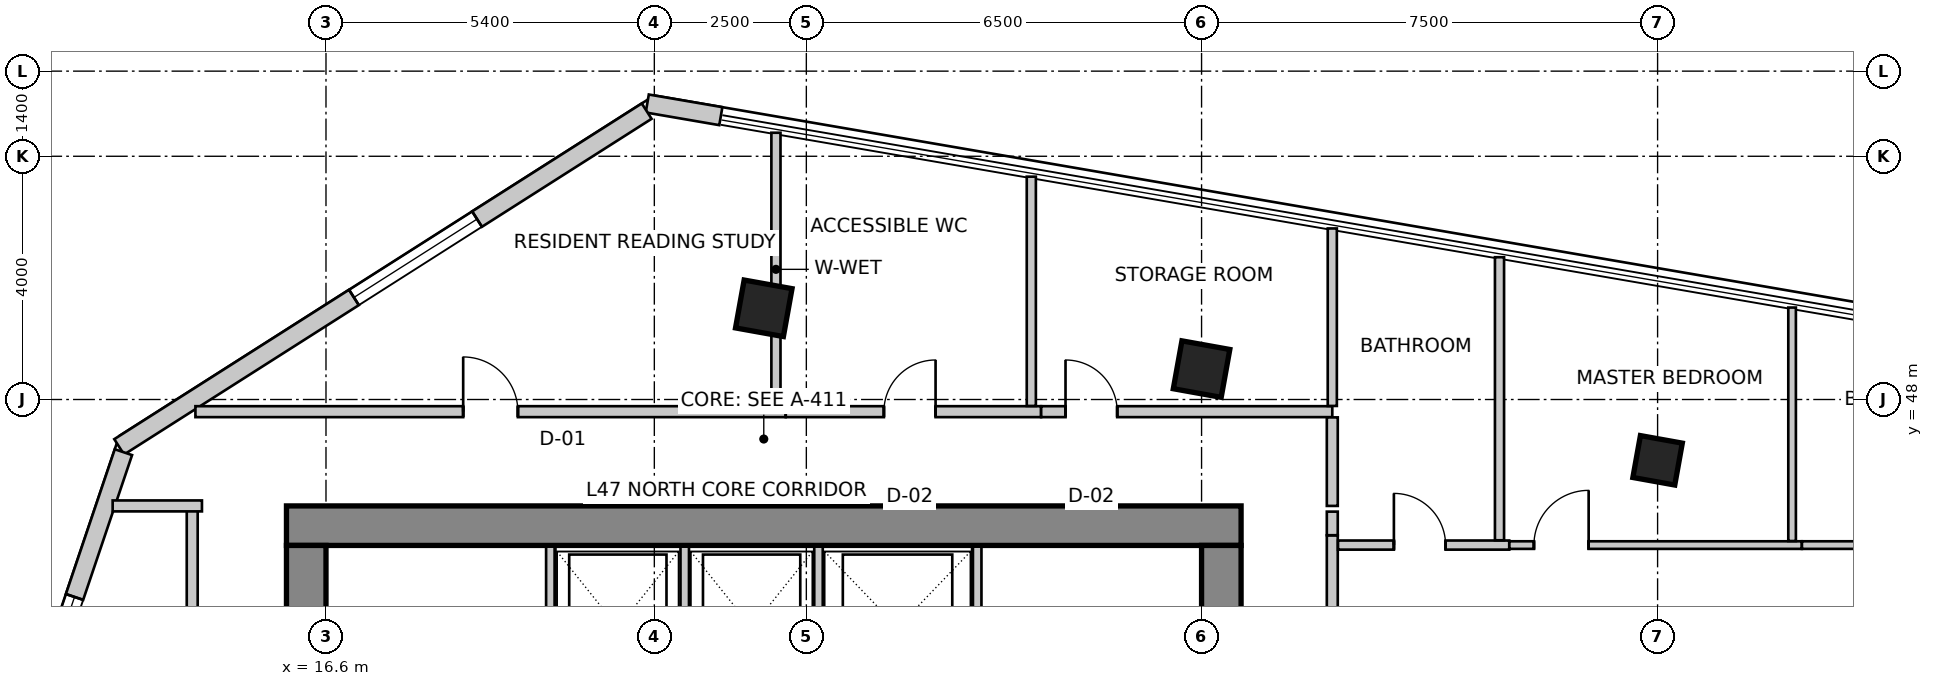
"""IFC4 building model, lengths in metres.
Left out: names, types, materials, properties, quantities, classifications, styles, units other than length and angle.
Written with IfcOpenShell. Run it as: python <this file> out.ifc"""

import sys

from ifc_helpers import new_model, si_unit, direction, frame, frame_2d, origin, origin_2d, place, context, subcontext, project, spatial, rectangle, extrude, source, transform, mapped, element, fill, save


model = new_model("IFC4")
c1 = context("Model", 3, precision=1e-05, world=origin(), true_north=direction((0.0, 1.0)))
c2 = subcontext(c1, "Body", "Model", "MODEL_VIEW")
j1 = project(units=[si_unit("LENGTHUNIT", "METRE"), si_unit("PLANEANGLEUNIT", "RADIAN")], contexts=[c1])
p1 = place(None, origin())
s1 = spatial("IfcSite", under=j1, at=p1, CompositionType="ELEMENT")
p2 = place(p1, origin())
s2 = spatial("IfcBuilding", under=s1, at=p2, CompositionType="ELEMENT")
p3 = place(p2, frame((0.0, 0.0, 190.4)))
s3 = spatial("IfcBuildingStorey", under=s2, at=p3, CompositionType="ELEMENT", Elevation=190.4)
p4 = place(p3, frame((15.95, 45.925, 0.0), z_axis=(0.0, 0.0, 1.0), x_axis=(1.0, 0.0, 0.0)))
e1 = element("IfcWall", 1, at=p4, inside=s3, PredefinedType="SHEAR", context=c2, shape_type="SweptSolid", body=[
    extrude(rectangle(XDim=15.7, YDim=0.65, at=frame_2d((7.85, 0.0))), origin(), (0.0, 0.0, 1.0), 3.5),
])
p5 = place(p3, frame((16.275, 34.2, 0.0), z_axis=(0.0, 0.0, 1.0), x_axis=(0.0, 1.0, 0.0)))
e2 = element("IfcWall", 2, at=p5, inside=s3, PredefinedType="SHEAR", context=c2, shape_type="SweptSolid", body=[
    extrude(rectangle(XDim=11.4, YDim=0.65, at=frame_2d((5.7, 0.0))), origin(), (0.0, 0.0, 1.0), 3.5),
])
m1 = source(origin(), c2, "Body", "SweptSolid", [
    extrude(rectangle(XDim=1.1, YDim=2.15, at=frame_2d((0.55, 1.075))), frame((0.0, 0.335, 0.0), z_axis=(0.0, -1.0, 0.0), x_axis=(1.0, 0.0, 0.0)), (0.0, 0.0, 1.0), 0.67),
])
p6 = place(p5, frame((7.15, 0.0, 0.0)))
e3 = element("IfcOpeningElement", 3, at=p6, cuts=e2, PredefinedType="OPENING", context=c2, shape_type="MappedRepresentation", body=[
    mapped(m1, transform((0.0, 0.0, 0.0), scale=1.0)),
])
p7 = place(p3, frame((31.325, 34.2, 0.0), z_axis=(0.0, 0.0, 1.0), x_axis=(0.0, 1.0, 0.0)))
e4 = element("IfcWall", 4, at=p7, inside=s3, PredefinedType="SHEAR", context=c2, shape_type="SweptSolid", body=[
    extrude(rectangle(XDim=11.4, YDim=0.65, at=frame_2d((5.7, 0.0))), origin(), (0.0, 0.0, 1.0), 3.5),
])
p8 = place(p7, frame((7.35, 0.0, 0.0)))
e5 = element("IfcOpeningElement", 5, at=p8, cuts=e4, PredefinedType="OPENING", context=c2, shape_type="MappedRepresentation", body=[
    mapped(m1, transform((0.0, 0.0, 0.0), scale=1.0)),
])
m2 = source(origin(), c2, "Body", "SweptSolid", [
    extrude(rectangle(XDim=0.8, YDim=0.8, at=origin_2d()), origin(), (0.0, 0.0, 1.0), 3.5),
])
for number, where, z_axis, x_axis in (
    (6, (23.8, 49.5, 0.0), (0.0, 0.0, 1.0), (0.984, -0.177, 0.0)),
    (7, (31.0, 48.5, 0.0), (0.0, 0.0, 1.0), (0.984, -0.177, 0.0)),
):
    element("IfcColumn", number, at=place(p3, frame(where, z_axis=z_axis, x_axis=x_axis)), inside=s3, PredefinedType="COLUMN", context=c2, shape_type="MappedRepresentation", body=[
        mapped(m2, transform((0.0, 0.0, 0.0), scale=1.0)),
    ])
m3 = source(origin(), c2, "Body", "SweptSolid", [
    extrude(rectangle(XDim=0.7, YDim=0.7, at=origin_2d()), origin(), (0.0, 0.0, 1.0), 3.5),
])
p9 = place(p3, frame((38.5, 47.0, 0.0), z_axis=(0.0, 0.0, 1.0), x_axis=(0.984195607969, -0.17708474032, 0.0)))
e8 = element("IfcColumn", 8, at=p9, inside=s3, PredefinedType="COLUMN", context=c2, shape_type="MappedRepresentation", body=[
    mapped(m3, transform((0.0, 0.0, 0.0), scale=1.0)),
])
p10 = place(p3, frame((23.094, 52.66, 0.0), z_axis=(0.0, 0.0, 1.0), x_axis=(-0.985503719785, 0.169653818966, 0.0)))
e9 = element("IfcWall", 9, at=p10, inside=s3, PredefinedType="SOLIDWALL", context=c2, shape_type="SweptSolid", body=[
    extrude(rectangle(XDim=1.228, YDim=0.3, at=frame_2d((0.614, 0.0))), origin(), (0.0, 0.0, 1.0), 3.25),
])
p11 = place(p3, frame((21.875, 52.742, 0.0), z_axis=(0.0, 0.0, 1.0), x_axis=(-0.843666375448, -0.536867811419, 0.0)))
e10 = element("IfcWall", 10, at=p11, inside=s3, PredefinedType="SOLIDWALL", context=c2, shape_type="SweptSolid", body=[
    extrude(rectangle(XDim=10.284, YDim=0.3, at=frame_2d((5.142, 0.0))), origin(), (0.0, 0.0, 1.0), 3.25),
])
m4 = source(origin(), c2, "Body", "SweptSolid", [
    extrude(rectangle(XDim=2.4, YDim=2.2, at=frame_2d((1.2, 1.1))), frame((0.0, 0.16, 0.0), z_axis=(0.0, -1.0, 0.0), x_axis=(1.0, 0.0, 0.0)), (0.0, 0.0, 1.0), 0.32),
])
p12 = place(p11, frame((3.307, 0.0, 0.85)))
e11 = element("IfcOpeningElement", 11, at=p12, cuts=e10, PredefinedType="OPENING", context=c2, shape_type="MappedRepresentation", body=[
    mapped(m4, transform((0.0, 0.0, 0.0), scale=1.0)),
])
p13 = place(p3, frame((13.269, 47.134, 0.0), z_axis=(0.0, 0.0, 1.0), x_axis=(-0.319920776449, -0.947444297464, 0.0)))
e12 = element("IfcWall", 12, at=p13, inside=s3, PredefinedType="SOLIDWALL", context=c2, shape_type="SweptSolid", body=[
    extrude(rectangle(XDim=16.133, YDim=0.3, at=frame_2d((8.067, 0.0))), origin(), (0.0, 0.0, 1.0), 3.25),
])
m5 = source(origin(), c2, "Body", "SweptSolid", [
    extrude(rectangle(XDim=2.1, YDim=2.0, at=frame_2d((1.05, 1.0))), frame((0.0, 0.16, 0.0), z_axis=(0.0, -1.0, 0.0), x_axis=(1.0, 0.0, 0.0)), (0.0, 0.0, 1.0), 0.32),
])
p14 = place(p13, frame((2.513, 0.0, 0.85)))
e13 = element("IfcOpeningElement", 13, at=p14, cuts=e12, PredefinedType="OPENING", context=c2, shape_type="MappedRepresentation", body=[
    mapped(m5, transform((0.0, 0.0, 0.0), scale=1.0)),
])
p15 = place(p13, frame((7.26, 0.0, 0.85)))
e14 = element("IfcOpeningElement", 14, at=p15, cuts=e12, PredefinedType="OPENING", context=c2, shape_type="MappedRepresentation", body=[
    mapped(m4, transform((0.0, 0.0, 0.0), scale=1.0)),
])
p16 = place(p13, frame((12.307, 0.0, 0.85)))
e15 = element("IfcOpeningElement", 15, at=p16, cuts=e12, PredefinedType="OPENING", context=c2, shape_type="MappedRepresentation", body=[
    mapped(m5, transform((0.0, 0.0, 0.0), scale=1.0)),
])
for number, where, z_axis, x_axis in (
    (16, (20.29, 43.28, 0.0), (0.0, 0.0, 1.0), (0.0, 1.0, 0.0)),
    (17, (27.31, 43.28, 0.0), (0.0, 0.0, 1.0), (0.0, 1.0, 0.0)),
):
    element("IfcWall", number, at=place(p3, frame(where, z_axis=z_axis, x_axis=x_axis)), inside=s3, PredefinedType="SOLIDWALL", context=c2, shape_type="SweptSolid", body=[
        extrude(rectangle(XDim=2.3, YDim=0.14, at=frame_2d((1.15, 0.0))), origin(), (0.0, 0.0, 1.0), 3.25),
    ])
for number, where, z_axis, x_axis in (
    (18, (22.5, 43.02, 0.0), (0.0, 0.0, 1.0), (0.0, 1.0, 0.0)),
    (19, (24.7, 43.02, 0.0), (0.0, 0.0, 1.0), (0.0, 1.0, 0.0)),
):
    element("IfcWall", number, at=place(p3, frame(where, z_axis=z_axis, x_axis=x_axis)), inside=s3, PredefinedType="SOLIDWALL", context=c2, shape_type="SweptSolid", body=[
        extrude(rectangle(XDim=2.56, YDim=0.14, at=frame_2d((1.28, 0.0))), origin(), (0.0, 0.0, 1.0), 3.25),
    ])
p17 = place(p3, frame((14.4, 33.644, 0.0), z_axis=(0.0, 0.0, 1.0), x_axis=(0.0, 1.0, 0.0)))
e20 = element("IfcWall", 20, at=p17, inside=s3, PredefinedType="PARTITIONING", context=c2, shape_type="SweptSolid", body=[
    extrude(rectangle(XDim=12.606, YDim=0.18, at=frame_2d((6.303, 0.0))), origin(), (0.0, 0.0, 1.0), 3.25),
])
m6 = source(origin(), c2, "Body", "SweptSolid", [
    extrude(rectangle(XDim=0.9, YDim=2.15, at=frame_2d((0.45, 1.075))), frame((0.0, 0.1, 0.0), z_axis=(0.0, -1.0, 0.0), x_axis=(1.0, 0.0, 0.0)), (0.0, 0.0, 1.0), 0.2),
])
p18 = place(p17, frame((4.399, 0.0, 0.0)))
e21 = element("IfcOpeningElement", 21, at=p18, cuts=e20, PredefinedType="OPENING", context=c2, shape_type="MappedRepresentation", body=[
    mapped(m6, transform((0.0, 0.0, 0.0), scale=1.0)),
])
p19 = place(p3, frame((14.56, 46.25, 0.0), z_axis=(0.0, 0.0, 1.0), x_axis=(-1.0, 0.0, 0.0)))
e22 = element("IfcWall", 22, at=p19, inside=s3, PredefinedType="PARTITIONING", context=c2, shape_type="SweptSolid", body=[
    extrude(rectangle(XDim=1.469, YDim=0.18, at=frame_2d((0.734, 0.0))), origin(), (0.0, 0.0, 1.0), 3.25),
])
p20 = place(p3, frame((14.453, 47.8, 0.0), z_axis=(0.0, 0.0, 1.0), x_axis=(1.0, 0.0, 0.0)))
e23 = element("IfcWall", 23, at=p20, inside=s3, PredefinedType="PARTITIONING", context=c2, shape_type="SweptSolid", body=[
    extrude(rectangle(XDim=9.707, YDim=0.18, at=frame_2d((4.854, 0.0))), origin(), (0.0, 0.0, 1.0), 2.934),
])
p21 = place(p20, frame((4.404, 0.0, 0.0)))
e24 = element("IfcOpeningElement", 24, at=p21, cuts=e23, PredefinedType="OPENING", context=c2, shape_type="MappedRepresentation", body=[
    mapped(m6, transform((0.0, 0.0, 0.0), scale=1.0)),
])
p22 = place(p3, frame((24.162, 47.8, 0.0), z_axis=(0.0, 0.0, 1.0), x_axis=(1.0, 0.0, 0.0)))
e25 = element("IfcWall", 25, at=p22, inside=s3, PredefinedType="PARTITIONING", context=c2, shape_type="SweptSolid", body=[
    extrude(rectangle(XDim=4.198, YDim=0.18, at=frame_2d((2.099, 0.0))), origin(), (0.0, 0.0, 1.0), 3.25),
])
m7 = source(origin(), c2, "Body", "SweptSolid", [
    extrude(rectangle(XDim=0.85, YDim=2.15, at=frame_2d((0.425, 1.075))), frame((0.0, 0.1, 0.0), z_axis=(0.0, -1.0, 0.0), x_axis=(1.0, 0.0, 0.0)), (0.0, 0.0, 1.0), 0.2),
])
p23 = place(p22, frame((1.613, 0.0, 0.0)))
e26 = element("IfcOpeningElement", 26, at=p23, cuts=e25, PredefinedType="OPENING", context=c2, shape_type="MappedRepresentation", body=[
    mapped(m7, transform((0.0, 0.0, 0.0), scale=1.0)),
])
p24 = place(p3, frame((28.362, 47.8, 0.0), z_axis=(0.0, 0.0, 1.0), x_axis=(1.0, 0.0, 0.0)))
e27 = element("IfcWall", 27, at=p24, inside=s3, PredefinedType="PARTITIONING", context=c2, shape_type="SweptSolid", body=[
    extrude(rectangle(XDim=4.788, YDim=0.18, at=frame_2d((2.394, 0.0))), origin(), (0.0, 0.0, 1.0), 2.822),
])
p25 = place(p24, frame((0.401, 0.0, 0.0)))
e28 = element("IfcOpeningElement", 28, at=p25, cuts=e27, PredefinedType="OPENING", context=c2, shape_type="MappedRepresentation", body=[
    mapped(m7, transform((0.0, 0.0, 0.0), scale=1.0)),
])
p26 = place(p3, frame((33.15, 47.706, 0.0), z_axis=(0.0, 0.0, 1.0), x_axis=(0.0, -1.0, 0.0)))
e29 = element("IfcWall", 29, at=p26, inside=s3, PredefinedType="PARTITIONING", context=c2, shape_type="SweptSolid", body=[
    extrude(rectangle(XDim=1.456, YDim=0.18, at=frame_2d((0.728, 0.0))), origin(), (0.0, 0.0, 1.0), 2.822),
])
p27 = place(p3, frame((33.15, 45.766, 0.0), z_axis=(0.0, 0.0, 1.0), x_axis=(0.0, -1.0, 0.0)))
e30 = element("IfcWall", 30, at=p27, inside=s3, PredefinedType="PARTITIONING", context=c2, shape_type="SweptSolid", body=[
    extrude(rectangle(XDim=5.526, YDim=0.18, at=frame_2d((2.763, 0.0))), origin(), (0.0, 0.0, 1.0), 2.822),
])
p28 = place(p3, frame((33.15, 46.156, 0.0), z_axis=(0.0, 0.0, 1.0), x_axis=(0.0, -1.0, 0.0)))
e31 = element("IfcWall", 31, at=p28, inside=s3, PredefinedType="PARTITIONING", context=c2, shape_type="SweptSolid", body=[
    extrude(rectangle(XDim=0.388, YDim=0.18, at=frame_2d((0.194, 0.0))), origin(), (0.0, 0.0, 1.0), 2.934),
])
p29 = place(p3, frame((24.0, 52.387, 0.0), z_axis=(0.0, 0.0, 1.0), x_axis=(0.0, -1.0, 0.0)))
e32 = element("IfcWall", 32, at=p29, inside=s3, PredefinedType="PARTITIONING", context=c2, shape_type="SweptSolid", body=[
    extrude(rectangle(XDim=4.493, YDim=0.15, at=frame_2d((2.247, 0.0))), origin(), (0.0, 0.0, 1.0), 2.542),
])
p30 = place(p3, frame((28.2, 51.665, 0.0), z_axis=(0.0, 0.0, 1.0), x_axis=(0.0, -1.0, 0.0)))
e33 = element("IfcWall", 33, at=p30, inside=s3, PredefinedType="PARTITIONING", context=c2, shape_type="SweptSolid", body=[
    extrude(rectangle(XDim=3.771, YDim=0.15, at=frame_2d((1.885, 0.0))), origin(), (0.0, 0.0, 1.0), 2.542),
])
p31 = place(p3, frame((33.15, 50.813, 0.0), z_axis=(0.0, 0.0, 1.0), x_axis=(0.0, -1.0, 0.0)))
e34 = element("IfcWall", 34, at=p31, inside=s3, PredefinedType="PARTITIONING", context=c2, shape_type="SweptSolid", body=[
    extrude(rectangle(XDim=2.919, YDim=0.15, at=frame_2d((1.459, 0.0))), origin(), (0.0, 0.0, 1.0), 2.542),
])
p32 = place(p3, frame((33.244, 45.606, 0.0), z_axis=(0.0, 0.0, 1.0), x_axis=(1.0, 0.0, 0.0)))
e35 = element("IfcWall", 35, at=p32, inside=s3, PredefinedType="PARTITIONING", context=c2, shape_type="SweptSolid", body=[
    extrude(rectangle(XDim=2.816, YDim=0.15, at=frame_2d((1.408, 0.0))), origin(), (0.0, 0.0, 1.0), 2.822),
])
m8 = source(origin(), c2, "Body", "SweptSolid", [
    extrude(rectangle(XDim=0.85, YDim=2.15, at=frame_2d((0.425, 1.075))), frame((0.0, 0.085, 0.0), z_axis=(0.0, -1.0, 0.0), x_axis=(1.0, 0.0, 0.0)), (0.0, 0.0, 1.0), 0.17),
])
p33 = place(p32, frame((0.919, 0.0, 0.0)))
e36 = element("IfcOpeningElement", 36, at=p33, cuts=e35, PredefinedType="OPENING", context=c2, shape_type="MappedRepresentation", body=[
    mapped(m8, transform((0.0, 0.0, 0.0), scale=1.0)),
])
p34 = place(p3, frame((36.062, 45.606, 0.0), z_axis=(0.0, 0.0, 1.0), x_axis=(1.0, 0.0, 0.0)))
e37 = element("IfcWall", 37, at=p34, inside=s3, PredefinedType="PARTITIONING", context=c2, shape_type="SweptSolid", body=[
    extrude(rectangle(XDim=4.81, YDim=0.125, at=frame_2d((2.405, 0.0))), origin(), (0.0, 0.0, 1.0), 2.766),
])
m9 = source(origin(), c2, "Body", "SweptSolid", [
    extrude(rectangle(XDim=0.9, YDim=2.15, at=frame_2d((0.45, 1.075))), frame((0.0, 0.073, 0.0), z_axis=(0.0, -1.0, 0.0), x_axis=(1.0, 0.0, 0.0)), (0.0, 0.0, 1.0), 0.145),
])
p35 = place(p34, frame((0.404, 0.0, 0.0)))
e38 = element("IfcOpeningElement", 38, at=p35, cuts=e37, PredefinedType="OPENING", context=c2, shape_type="MappedRepresentation", body=[
    mapped(m9, transform((0.0, 0.0, 0.0), scale=1.0)),
])
p36 = place(p3, frame((40.874, 45.606, 0.0), z_axis=(0.0, 0.0, 1.0), x_axis=(1.0, 0.0, 0.0)))
e39 = element("IfcWall", 39, at=p36, inside=s3, PredefinedType="PARTITIONING", context=c2, shape_type="SweptSolid", body=[
    extrude(rectangle(XDim=1.409, YDim=0.125, at=frame_2d((0.705, 0.0))), origin(), (0.0, 0.0, 1.0), 3.25),
])
p37 = place(p3, frame((35.9, 50.34, 0.0), z_axis=(0.0, 0.0, 1.0), x_axis=(0.0, -1.0, 0.0)))
e40 = element("IfcWall", 40, at=p37, inside=s3, PredefinedType="PARTITIONING", context=c2, shape_type="SweptSolid", body=[
    extrude(rectangle(XDim=4.655, YDim=0.15, at=frame_2d((2.327, 0.0))), origin(), (0.0, 0.0, 1.0), 2.542),
])
p38 = place(p3, frame((40.712, 49.512, 0.0), z_axis=(0.0, 0.0, 1.0), x_axis=(0.0, -1.0, 0.0)))
e41 = element("IfcWall", 41, at=p38, inside=s3, PredefinedType="PARTITIONING", context=c2, shape_type="SweptSolid", body=[
    extrude(rectangle(XDim=3.84, YDim=0.125, at=frame_2d((1.92, 0.0))), origin(), (0.0, 0.0, 1.0), 2.542),
])
m10 = source(origin(), c2, "Body", "SweptSolid", [
    extrude(rectangle(XDim=2.4, YDim=2.2, at=frame_2d((1.2, 1.1))), frame((0.0, -0.015, 0.0), z_axis=(0.0, -1.0, 0.0), x_axis=(1.0, 0.0, 0.0)), (0.0, 0.0, 1.0), 0.06),
])
p39 = place(p12, origin())
e42 = element("IfcWindow", 42, at=p39, inside=s3, PartitioningType="SINGLE_PANEL", PredefinedType="WINDOW", context=c2, shape_type="MappedRepresentation", body=[
    mapped(m10, transform((0.0, 0.0, 0.0), scale=1.0)),
])
fill(e11, e42)
m11 = source(origin(), c2, "Body", "SweptSolid", [
    extrude(rectangle(XDim=2.1, YDim=2.0, at=frame_2d((1.05, 1.0))), frame((0.0, -0.015, 0.0), z_axis=(0.0, -1.0, 0.0), x_axis=(1.0, 0.0, 0.0)), (0.0, 0.0, 1.0), 0.06),
])
p40 = place(p14, origin())
e43 = element("IfcWindow", 43, at=p40, inside=s3, PartitioningType="SINGLE_PANEL", PredefinedType="WINDOW", context=c2, shape_type="MappedRepresentation", body=[
    mapped(m11, transform((0.0, 0.0, 0.0), scale=1.0)),
])
fill(e13, e43)
m12 = source(origin(), c2, "Body", "SweptSolid", [
    extrude(rectangle(XDim=0.9, YDim=2.15, at=frame_2d((0.45, 1.075))), frame((0.0, 0.025, 0.0), z_axis=(0.0, -1.0, 0.0), x_axis=(1.0, 0.0, 0.0)), (0.0, 0.0, 1.0), 0.05),
])
p41 = place(p21, origin())
e44 = element("IfcDoor", 44, at=p41, inside=s3, OperationType="SINGLE_SWING_LEFT", PredefinedType="DOOR", context=c2, shape_type="MappedRepresentation", body=[
    mapped(m12, transform((0.0, 0.0, 0.0), scale=1.0)),
])
fill(e24, e44)
m13 = source(origin(), c2, "Body", "SweptSolid", [
    extrude(rectangle(XDim=0.85, YDim=2.15, at=frame_2d((0.425, 1.075))), frame((0.0, 0.025, 0.0), z_axis=(0.0, -1.0, 0.0), x_axis=(1.0, 0.0, 0.0)), (0.0, 0.0, 1.0), 0.05),
])
p42 = place(p23, origin())
e45 = element("IfcDoor", 45, at=p42, inside=s3, OperationType="SINGLE_SWING_RIGHT", PredefinedType="DOOR", context=c2, shape_type="MappedRepresentation", body=[
    mapped(m13, transform((0.0, 0.0, 0.0), scale=1.0)),
])
fill(e26, e45)
p43 = place(p25, origin())
e46 = element("IfcDoor", 46, at=p43, inside=s3, OperationType="SINGLE_SWING_LEFT", PredefinedType="DOOR", context=c2, shape_type="MappedRepresentation", body=[
    mapped(m13, transform((0.0, 0.0, 0.0), scale=1.0)),
])
fill(e28, e46)
p44 = place(p33, origin())
e47 = element("IfcDoor", 47, at=p44, inside=s3, OperationType="SINGLE_SWING_LEFT", PredefinedType="DOOR", context=c2, shape_type="MappedRepresentation", body=[
    mapped(m13, transform((0.0, 0.0, 0.0), scale=1.0)),
])
fill(e36, e47)
p45 = place(p35, origin())
e48 = element("IfcDoor", 48, at=p45, inside=s3, OperationType="SINGLE_SWING_RIGHT", PredefinedType="DOOR", context=c2, shape_type="MappedRepresentation", body=[
    mapped(m12, transform((0.0, 0.0, 0.0), scale=1.0)),
])
fill(e38, e48)
save(model, sys.argv[1])
